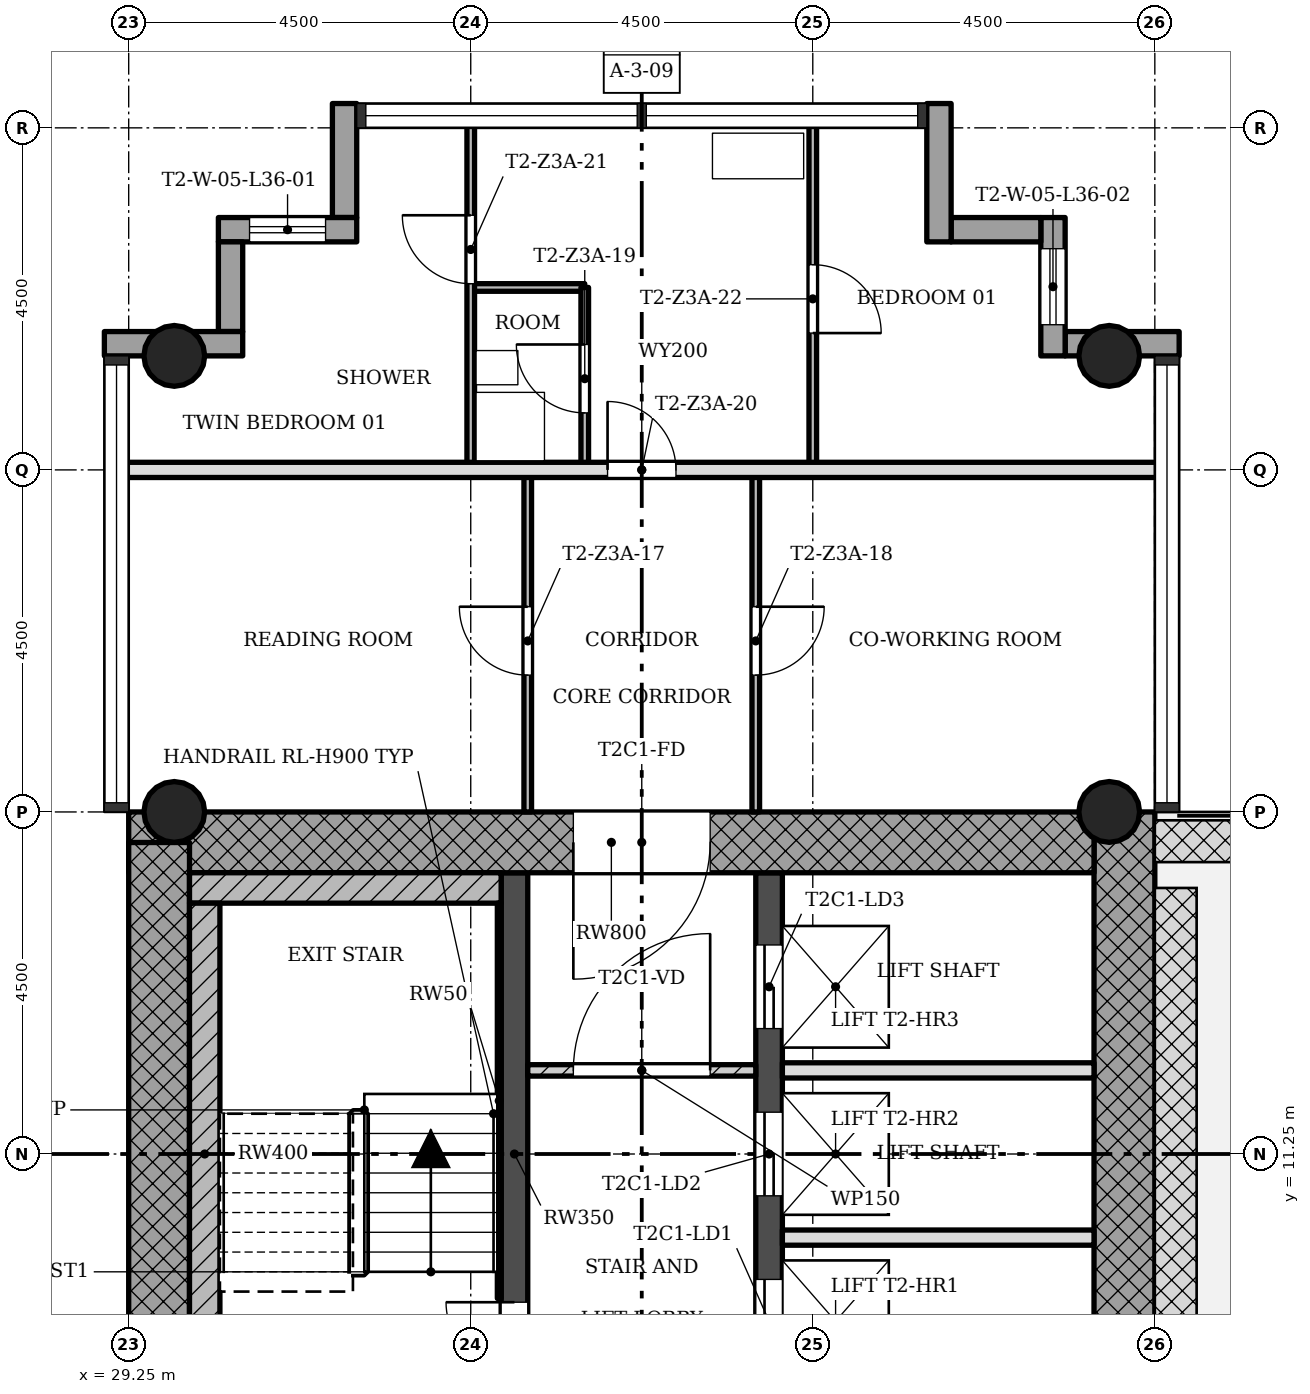
"""IFC4 building model, lengths in metres.
Left out: names, types, materials, properties, quantities, classifications, styles, units other than length and angle.
Written with IfcOpenShell. Run it as: python <this file> out.ifc"""

import sys

from ifc_helpers import new_model, si_unit, direction, frame, frame_2d, origin, origin_2d, place, context, subcontext, project, spatial, rectangle, hollow_circle, extrude, element, fill, save


model = new_model("IFC4")
c1 = context("Model", 3, precision=1e-05, world=origin(), true_north=direction((0.0, 1.0)))
c2 = subcontext(c1, "Body", "Model", "MODEL_VIEW")
j1 = project(units=[si_unit("LENGTHUNIT", "METRE"), si_unit("PLANEANGLEUNIT", "RADIAN")], contexts=[c1])
p1 = place(None, origin())
s1 = spatial("IfcSite", under=j1, at=p1, CompositionType="ELEMENT")
p2 = place(p1, origin())
s2 = spatial("IfcBuilding", under=s1, at=p2, CompositionType="ELEMENT")
p3 = place(p2, frame((0.0, 0.0, 133.7)))
s3 = spatial("IfcBuildingStorey", under=s2, at=p3, CompositionType="ELEMENT", Elevation=133.7)
p4 = place(p3, frame((42.35, 7.55, 0.0), z_axis=(0.0, 0.0, 1.0), x_axis=(0.0, 1.0, 0.0)))
e1 = element("IfcWall", 1, at=p4, inside=s3, PredefinedType="SHEAR", context=c2, shape_type="SweptSolid", body=[
    extrude(rectangle(XDim=8.2, YDim=0.8, at=frame_2d((4.1, 0.0))), origin(), (0.0, 0.0, 1.0), 3.4),
])
p5 = place(p3, frame((41.95, 15.35, 0.0), z_axis=(0.0, 0.0, 1.0), x_axis=(-1.0, 0.0, 0.0)))
e2 = element("IfcWall", 2, at=p5, inside=s3, PredefinedType="SHEAR", context=c2, shape_type="SweptSolid", body=[
    extrude(rectangle(XDim=12.7, YDim=0.8, at=frame_2d((6.35, 0.0))), origin(), (0.0, 0.0, 1.0), 3.4),
])
p6 = place(p5, frame((5.05, 0.0, 0.0)))
e3 = element("IfcOpeningElement", 3, at=p6, cuts=e2, PredefinedType="OPENING", context=c2, shape_type="SweptSolid", body=[
    extrude(rectangle(XDim=1.8, YDim=2.1, at=frame_2d((0.9, 1.05))), frame((0.0, 0.41, 0.0), z_axis=(0.0, -1.0, 0.0), x_axis=(1.0, 0.0, 0.0)), (0.0, 0.0, 1.0), 0.82),
])
p7 = place(p3, frame((29.65, 15.348, 0.0), z_axis=(0.0, 0.0, 1.0), x_axis=(0.0, -1.0, 0.0)))
e4 = element("IfcWall", 4, at=p7, inside=s3, PredefinedType="SHEAR", context=c2, shape_type="SweptSolid", body=[
    extrude(rectangle(XDim=8.796, YDim=0.8, at=frame_2d((4.398, 0.0))), origin(), (0.0, 0.0, 1.0), 3.4),
])
p8 = place(p3, frame((34.325, 7.55, 0.0), z_axis=(0.0, 0.0, 1.0), x_axis=(0.0, 1.0, 0.0)))
e5 = element("IfcWall", 5, at=p8, inside=s3, PredefinedType="SHEAR", context=c2, shape_type="SweptSolid", body=[
    extrude(rectangle(XDim=7.4, YDim=0.35, at=frame_2d((3.7, 0.0))), origin(), (0.0, 0.0, 1.0), 3.4),
])
p9 = place(p8, frame((0.85, 0.0, 0.0)))
e6 = element("IfcOpeningElement", 6, at=p9, cuts=e5, PredefinedType="OPENING", context=c2, shape_type="SweptSolid", body=[
    extrude(rectangle(XDim=0.9, YDim=2.1, at=frame_2d((0.45, 1.05))), frame((0.0, 0.185, 0.0), z_axis=(0.0, -1.0, 0.0), x_axis=(1.0, 0.0, 0.0)), (0.0, 0.0, 1.0), 0.37),
])
p10 = place(p3, frame((37.675, 7.55, 0.0), z_axis=(0.0, 0.0, 1.0), x_axis=(0.0, 1.0, 0.0)))
e7 = element("IfcWall", 7, at=p10, inside=s3, PredefinedType="SHEAR", context=c2, shape_type="SweptSolid", body=[
    extrude(rectangle(XDim=7.4, YDim=0.35, at=frame_2d((3.7, 0.0))), origin(), (0.0, 0.0, 1.0), 3.4),
])
p11 = place(p10, frame((0.95, 0.0, 0.0)))
e8 = element("IfcOpeningElement", 8, at=p11, cuts=e7, PredefinedType="OPENING", context=c2, shape_type="SweptSolid", body=[
    extrude(rectangle(XDim=1.1, YDim=2.1, at=frame_2d((0.55, 1.05))), frame((0.0, 0.185, 0.0), z_axis=(0.0, -1.0, 0.0), x_axis=(1.0, 0.0, 0.0)), (0.0, 0.0, 1.0), 0.37),
])
p12 = place(p10, frame((3.15, 0.0, 0.0)))
e9 = element("IfcOpeningElement", 9, at=p12, cuts=e7, PredefinedType="OPENING", context=c2, shape_type="SweptSolid", body=[
    extrude(rectangle(XDim=1.1, YDim=2.1, at=frame_2d((0.55, 1.05))), frame((0.0, 0.185, 0.0), z_axis=(0.0, -1.0, 0.0), x_axis=(1.0, 0.0, 0.0)), (0.0, 0.0, 1.0), 0.37),
])
p13 = place(p10, frame((5.35, 0.0, 0.0)))
e10 = element("IfcOpeningElement", 10, at=p13, cuts=e7, PredefinedType="OPENING", context=c2, shape_type="SweptSolid", body=[
    extrude(rectangle(XDim=1.1, YDim=2.1, at=frame_2d((0.55, 1.05))), frame((0.0, 0.185, 0.0), z_axis=(0.0, -1.0, 0.0), x_axis=(1.0, 0.0, 0.0)), (0.0, 0.0, 1.0), 0.37),
])
for number, where, z_axis, x_axis in (
    (11, (42.15, 15.75, 0.0), (0.0, 0.0, 1.0), (1.0, 0.0, 0.0)),
    (12, (29.85, 15.75, 0.0), (0.0, 0.0, 1.0), (1.0, 0.0, 0.0)),
    (13, (42.15, 21.75, 0.0), (0.0, 0.0, 1.0), (1.0, 0.0, 0.0)),
    (14, (29.85, 21.75, 0.0), (0.0, 0.0, 1.0), (1.0, 0.0, 0.0)),
):
    element("IfcColumn", number, at=place(p3, frame(where, z_axis=z_axis, x_axis=x_axis)), inside=s3, PredefinedType="COLUMN", context=c2, shape_type="SweptSolid", body=[
        extrude(hollow_circle(Radius=0.4, WallThickness=0.028, at=origin_2d()), origin(), (0.0, 0.0, 1.0), 3.4),
    ])
p14 = place(p3, frame((43.07, 21.91, -0.3), z_axis=(0.0, 0.0, 1.0), x_axis=(-1.0, 0.0, 0.0)))
e15 = element("IfcWall", 15, at=p14, inside=s3, PredefinedType="STANDARD", context=c2, shape_type="SweptSolid", body=[
    extrude(rectangle(XDim=1.5, YDim=0.32, at=frame_2d((0.75, 0.0))), origin(), (0.0, 0.0, 1.0), 3.4),
])
p15 = place(p3, frame((41.41, 21.75, -0.3), z_axis=(0.0, 0.0, 1.0), x_axis=(0.0, 1.0, 0.0)))
e16 = element("IfcWall", 16, at=p15, inside=s3, PredefinedType="STANDARD", context=c2, shape_type="SweptSolid", body=[
    extrude(rectangle(XDim=1.82, YDim=0.32, at=frame_2d((0.91, 0.0))), origin(), (0.0, 0.0, 1.0), 3.4),
])
p16 = place(p15, frame((0.41, 0.0, 1.2)))
e17 = element("IfcOpeningElement", 17, at=p16, cuts=e16, PredefinedType="OPENING", context=c2, shape_type="SweptSolid", body=[
    extrude(rectangle(XDim=1.0, YDim=1.5, at=frame_2d((0.5, 0.75))), frame((0.0, 0.17, 0.0), z_axis=(0.0, -1.0, 0.0), x_axis=(1.0, 0.0, 0.0)), (0.0, 0.0, 1.0), 0.34),
])
p17 = place(p3, frame((41.25, 23.41, -0.3), z_axis=(0.0, 0.0, 1.0), x_axis=(-1.0, 0.0, 0.0)))
e18 = element("IfcWall", 18, at=p17, inside=s3, PredefinedType="STANDARD", context=c2, shape_type="SweptSolid", body=[
    extrude(rectangle(XDim=1.18, YDim=0.32, at=frame_2d((0.59, 0.0))), origin(), (0.0, 0.0, 1.0), 3.4),
])
p18 = place(p3, frame((39.91, 23.25, -0.3), z_axis=(0.0, 0.0, 1.0), x_axis=(0.0, 1.0, 0.0)))
e19 = element("IfcWall", 19, at=p18, inside=s3, PredefinedType="STANDARD", context=c2, shape_type="SweptSolid", body=[
    extrude(rectangle(XDim=1.82, YDim=0.32, at=frame_2d((0.91, 0.0))), origin(), (0.0, 0.0, 1.0), 3.4),
])
p19 = place(p3, frame((32.09, 25.07, -0.3), z_axis=(0.0, 0.0, 1.0), x_axis=(0.0, -1.0, 0.0)))
e20 = element("IfcWall", 20, at=p19, inside=s3, PredefinedType="STANDARD", context=c2, shape_type="SweptSolid", body=[
    extrude(rectangle(XDim=1.5, YDim=0.32, at=frame_2d((0.75, 0.0))), origin(), (0.0, 0.0, 1.0), 3.4),
])
p20 = place(p3, frame((32.25, 23.41, -0.3), z_axis=(0.0, 0.0, 1.0), x_axis=(-1.0, 0.0, 0.0)))
e21 = element("IfcWall", 21, at=p20, inside=s3, PredefinedType="STANDARD", context=c2, shape_type="SweptSolid", body=[
    extrude(rectangle(XDim=1.82, YDim=0.32, at=frame_2d((0.91, 0.0))), origin(), (0.0, 0.0, 1.0), 3.4),
])
p21 = place(p20, frame((0.41, 0.0, 1.2)))
e22 = element("IfcOpeningElement", 22, at=p21, cuts=e21, PredefinedType="OPENING", context=c2, shape_type="SweptSolid", body=[
    extrude(rectangle(XDim=1.0, YDim=1.5, at=frame_2d((0.5, 0.75))), frame((0.0, 0.17, 0.0), z_axis=(0.0, -1.0, 0.0), x_axis=(1.0, 0.0, 0.0)), (0.0, 0.0, 1.0), 0.34),
])
p22 = place(p3, frame((30.59, 23.25, -0.3), z_axis=(0.0, 0.0, 1.0), x_axis=(0.0, -1.0, 0.0)))
e23 = element("IfcWall", 23, at=p22, inside=s3, PredefinedType="STANDARD", context=c2, shape_type="SweptSolid", body=[
    extrude(rectangle(XDim=1.18, YDim=0.32, at=frame_2d((0.59, 0.0))), origin(), (0.0, 0.0, 1.0), 3.4),
])
p23 = place(p3, frame((30.75, 21.91, -0.3), z_axis=(0.0, 0.0, 1.0), x_axis=(-1.0, 0.0, 0.0)))
e24 = element("IfcWall", 24, at=p23, inside=s3, PredefinedType="STANDARD", context=c2, shape_type="SweptSolid", body=[
    extrude(rectangle(XDim=1.82, YDim=0.32, at=frame_2d((0.91, 0.0))), origin(), (0.0, 0.0, 1.0), 3.4),
])
p24 = place(p3, frame((37.5, 12.35, 0.0), z_axis=(0.0, 0.0, 1.0), x_axis=(-1.0, 0.0, 0.0)))
e25 = element("IfcWall", 25, at=p24, inside=s3, PredefinedType="PARTITIONING", context=c2, shape_type="SweptSolid", body=[
    extrude(rectangle(XDim=3.0, YDim=0.15, at=frame_2d((1.5, 0.0))), origin(), (0.0, 0.0, 1.0), 3.0),
])
p25 = place(p24, frame((0.6, 0.0, 0.0)))
e26 = element("IfcOpeningElement", 26, at=p25, cuts=e25, PredefinedType="OPENING", context=c2, shape_type="SweptSolid", body=[
    extrude(rectangle(XDim=1.8, YDim=2.1, at=frame_2d((0.9, 1.05))), frame((0.0, 0.085, 0.0), z_axis=(0.0, -1.0, 0.0), x_axis=(1.0, 0.0, 0.0)), (0.0, 0.0, 1.0), 0.17),
])
for number, where, z_axis, x_axis in (
    (27, (41.95, 10.15, 0.0), (0.0, 0.0, 1.0), (-1.0, 0.0, 0.0)),
    (28, (41.95, 12.35, 0.0), (0.0, 0.0, 1.0), (-1.0, 0.0, 0.0)),
):
    element("IfcWall", number, at=place(p3, frame(where, z_axis=z_axis, x_axis=x_axis)), inside=s3, PredefinedType="SOLIDWALL", context=c2, shape_type="SweptSolid", body=[
        extrude(rectangle(XDim=4.1, YDim=0.2, at=frame_2d((2.05, 0.0))), origin(), (0.0, 0.0, 1.0), 3.0),
    ])
p26 = place(p3, frame((42.85, 20.25, 0.0), z_axis=(0.0, 0.0, 1.0), x_axis=(-1.0, 0.0, 0.0)))
e29 = element("IfcWall", 29, at=p26, inside=s3, PredefinedType="SOLIDWALL", context=c2, shape_type="SweptSolid", body=[
    extrude(rectangle(XDim=13.7, YDim=0.2, at=frame_2d((6.85, 0.0))), origin(), (0.0, 0.0, 1.0), 3.0),
])
p27 = place(p26, frame((6.4, 0.0, 0.0)))
e30 = element("IfcOpeningElement", 30, at=p27, cuts=e29, PredefinedType="OPENING", context=c2, shape_type="SweptSolid", body=[
    extrude(rectangle(XDim=0.9, YDim=2.1, at=frame_2d((0.45, 1.05))), frame((0.0, 0.11, 0.0), z_axis=(0.0, -1.0, 0.0), x_axis=(1.0, 0.0, 0.0)), (0.0, 0.0, 1.0), 0.22),
])
p28 = place(p3, frame((35.25, 22.65, 0.0), z_axis=(0.0, 0.0, 1.0), x_axis=(-1.0, 0.0, 0.0)))
e31 = element("IfcWall", 31, at=p28, inside=s3, PredefinedType="PARTITIONING", context=c2, shape_type="SweptSolid", body=[
    extrude(rectangle(XDim=1.5, YDim=0.1, at=frame_2d((0.75, 0.0))), origin(), (0.0, 0.0, 1.0), 3.0),
])
p29 = place(p3, frame((38.25, 20.25, 0.0), z_axis=(0.0, 0.0, 1.0), x_axis=(0.0, 1.0, 0.0)))
e32 = element("IfcWall", 32, at=p29, inside=s3, PredefinedType="PARTITIONING", context=c2, shape_type="SweptSolid", body=[
    extrude(rectangle(XDim=4.6, YDim=0.1, at=frame_2d((2.3, 0.0))), origin(), (0.0, 0.0, 1.0), 3.0),
])
p30 = place(p29, frame((1.8, 0.0, 0.0)))
e33 = element("IfcOpeningElement", 33, at=p30, cuts=e32, PredefinedType="OPENING", context=c2, shape_type="SweptSolid", body=[
    extrude(rectangle(XDim=0.9, YDim=2.1, at=frame_2d((0.45, 1.05))), frame((0.0, 0.06, 0.0), z_axis=(0.0, -1.0, 0.0), x_axis=(1.0, 0.0, 0.0)), (0.0, 0.0, 1.0), 0.12),
])
p31 = place(p3, frame((37.5, 15.75, 0.0), z_axis=(0.0, 0.0, 1.0), x_axis=(0.0, 1.0, 0.0)))
e34 = element("IfcWall", 34, at=p31, inside=s3, PredefinedType="PARTITIONING", context=c2, shape_type="SweptSolid", body=[
    extrude(rectangle(XDim=4.5, YDim=0.1, at=frame_2d((2.25, 0.0))), origin(), (0.0, 0.0, 1.0), 3.0),
])
p32 = place(p31, frame((1.8, 0.0, 0.0)))
e35 = element("IfcOpeningElement", 35, at=p32, cuts=e34, PredefinedType="OPENING", context=c2, shape_type="SweptSolid", body=[
    extrude(rectangle(XDim=0.9, YDim=2.1, at=frame_2d((0.45, 1.05))), frame((0.0, 0.06, 0.0), z_axis=(0.0, -1.0, 0.0), x_axis=(1.0, 0.0, 0.0)), (0.0, 0.0, 1.0), 0.12),
])
p33 = place(p3, frame((35.25, 20.25, 0.0), z_axis=(0.0, 0.0, 1.0), x_axis=(0.0, 1.0, 0.0)))
e36 = element("IfcWall", 36, at=p33, inside=s3, PredefinedType="PARTITIONING", context=c2, shape_type="SweptSolid", body=[
    extrude(rectangle(XDim=2.4, YDim=0.1, at=frame_2d((1.2, 0.0))), origin(), (0.0, 0.0, 1.0), 3.0),
])
p34 = place(p33, frame((0.75, 0.0, 0.0)))
e37 = element("IfcOpeningElement", 37, at=p34, cuts=e36, PredefinedType="OPENING", context=c2, shape_type="SweptSolid", body=[
    extrude(rectangle(XDim=0.9, YDim=2.1, at=frame_2d((0.45, 1.05))), frame((0.0, 0.06, 0.0), z_axis=(0.0, -1.0, 0.0), x_axis=(1.0, 0.0, 0.0)), (0.0, 0.0, 1.0), 0.12),
])
p35 = place(p3, frame((34.5, 15.75, 0.0), z_axis=(0.0, 0.0, 1.0), x_axis=(0.0, 1.0, 0.0)))
e38 = element("IfcWall", 38, at=p35, inside=s3, PredefinedType="PARTITIONING", context=c2, shape_type="SweptSolid", body=[
    extrude(rectangle(XDim=4.5, YDim=0.1, at=frame_2d((2.25, 0.0))), origin(), (0.0, 0.0, 1.0), 3.0),
])
p36 = place(p35, frame((1.8, 0.0, 0.0)))
e39 = element("IfcOpeningElement", 39, at=p36, cuts=e38, PredefinedType="OPENING", context=c2, shape_type="SweptSolid", body=[
    extrude(rectangle(XDim=0.9, YDim=2.1, at=frame_2d((0.45, 1.05))), frame((0.0, 0.06, 0.0), z_axis=(0.0, -1.0, 0.0), x_axis=(1.0, 0.0, 0.0)), (0.0, 0.0, 1.0), 0.12),
])
p37 = place(p3, frame((33.75, 20.25, 0.0), z_axis=(0.0, 0.0, 1.0), x_axis=(0.0, 1.0, 0.0)))
e40 = element("IfcWall", 40, at=p37, inside=s3, PredefinedType="PARTITIONING", context=c2, shape_type="SweptSolid", body=[
    extrude(rectangle(XDim=4.6, YDim=0.1, at=frame_2d((2.3, 0.0))), origin(), (0.0, 0.0, 1.0), 3.0),
])
p38 = place(p37, frame((2.45, 0.0, 0.0)))
e41 = element("IfcOpeningElement", 41, at=p38, cuts=e40, PredefinedType="OPENING", context=c2, shape_type="SweptSolid", body=[
    extrude(rectangle(XDim=0.9, YDim=2.1, at=frame_2d((0.45, 1.05))), frame((0.0, 0.06, 0.0), z_axis=(0.0, -1.0, 0.0), x_axis=(1.0, 0.0, 0.0)), (0.0, 0.0, 1.0), 0.12),
])
p39 = place(p3, frame((34.15, 14.75, 0.0), z_axis=(0.0, 0.0, 1.0), x_axis=(-1.0, 0.0, 0.0)))
e42 = element("IfcWall", 42, at=p39, inside=s3, PredefinedType="SHEAR", context=c2, shape_type="SweptSolid", body=[
    extrude(rectangle(XDim=4.1, YDim=0.4, at=frame_2d((2.05, 0.0))), origin(), (0.0, 0.0, 1.0), 3.4),
])
p40 = place(p3, frame((30.25, 7.95, 0.0), z_axis=(0.0, 0.0, 1.0), x_axis=(0.0, 1.0, 0.0)))
e43 = element("IfcWall", 43, at=p40, inside=s3, PredefinedType="SHEAR", context=c2, shape_type="SweptSolid", body=[
    extrude(rectangle(XDim=6.6, YDim=0.4, at=frame_2d((3.3, 0.0))), origin(), (0.0, 0.0, 1.0), 3.4),
])
p41 = place(p3, frame((34.125, 9.35, 0.0), z_axis=(0.0, 0.0, 1.0), x_axis=(0.0, 1.0, 0.0)))
e44 = element("IfcWall", 44, at=p41, inside=s3, PredefinedType="SHEAR", context=c2, shape_type="SweptSolid", body=[
    extrude(rectangle(XDim=5.2, YDim=0.05, at=frame_2d((2.6, 0.0))), origin(), (0.0, 0.0, 1.0), 3.4),
])
p42 = place(p25, origin())
e45 = element("IfcDoor", 45, at=p42, inside=s3, OperationType="SINGLE_SWING_LEFT", PredefinedType="DOOR", context=c2, shape_type="SweptSolid", body=[
    extrude(rectangle(XDim=1.8, YDim=2.1, at=frame_2d((0.9, 1.05))), frame((0.0, 0.025, 0.0), z_axis=(0.0, -1.0, 0.0), x_axis=(1.0, 0.0, 0.0)), (0.0, 0.0, 1.0), 0.05),
])
fill(e26, e45)
p43 = place(p36, origin())
e46 = element("IfcDoor", 46, at=p43, inside=s3, OperationType="SINGLE_SWING_LEFT", PredefinedType="DOOR", context=c2, shape_type="SweptSolid", body=[
    extrude(rectangle(XDim=0.9, YDim=2.1, at=frame_2d((0.45, 1.05))), frame((0.0, 0.025, 0.0), z_axis=(0.0, -1.0, 0.0), x_axis=(1.0, 0.0, 0.0)), (0.0, 0.0, 1.0), 0.05),
])
fill(e39, e46)
p44 = place(p32, origin())
e47 = element("IfcDoor", 47, at=p44, inside=s3, OperationType="SINGLE_SWING_RIGHT", PredefinedType="DOOR", context=c2, shape_type="SweptSolid", body=[
    extrude(rectangle(XDim=0.9, YDim=2.1, at=frame_2d((0.45, 1.05))), frame((0.0, 0.025, 0.0), z_axis=(0.0, -1.0, 0.0), x_axis=(1.0, 0.0, 0.0)), (0.0, 0.0, 1.0), 0.05),
])
fill(e35, e47)
p45 = place(p34, origin())
e48 = element("IfcDoor", 48, at=p45, inside=s3, OperationType="SINGLE_SWING_LEFT", PredefinedType="DOOR", context=c2, shape_type="SweptSolid", body=[
    extrude(rectangle(XDim=0.9, YDim=2.1, at=frame_2d((0.45, 1.05))), frame((0.0, 0.025, 0.0), z_axis=(0.0, -1.0, 0.0), x_axis=(1.0, 0.0, 0.0)), (0.0, 0.0, 1.0), 0.05),
])
fill(e37, e48)
p46 = place(p27, origin())
e49 = element("IfcDoor", 49, at=p46, inside=s3, OperationType="SINGLE_SWING_RIGHT", PredefinedType="DOOR", context=c2, shape_type="SweptSolid", body=[
    extrude(rectangle(XDim=0.9, YDim=2.1, at=frame_2d((0.45, 1.05))), frame((0.0, 0.025, 0.0), z_axis=(0.0, -1.0, 0.0), x_axis=(1.0, 0.0, 0.0)), (0.0, 0.0, 1.0), 0.05),
])
fill(e30, e49)
p47 = place(p38, origin())
e50 = element("IfcDoor", 50, at=p47, inside=s3, OperationType="SINGLE_SWING_LEFT", PredefinedType="DOOR", context=c2, shape_type="SweptSolid", body=[
    extrude(rectangle(XDim=0.9, YDim=2.1, at=frame_2d((0.45, 1.05))), frame((0.0, 0.025, 0.0), z_axis=(0.0, -1.0, 0.0), x_axis=(1.0, 0.0, 0.0)), (0.0, 0.0, 1.0), 0.05),
])
fill(e41, e50)
p48 = place(p30, origin())
e51 = element("IfcDoor", 51, at=p48, inside=s3, OperationType="SINGLE_SWING_LEFT", PredefinedType="DOOR", context=c2, shape_type="SweptSolid", body=[
    extrude(rectangle(XDim=0.9, YDim=2.1, at=frame_2d((0.45, 1.05))), frame((0.0, 0.025, 0.0), z_axis=(0.0, -1.0, 0.0), x_axis=(1.0, 0.0, 0.0)), (0.0, 0.0, 1.0), 0.05),
])
fill(e33, e51)
p49 = place(p9, origin())
e52 = element("IfcDoor", 52, at=p49, inside=s3, OperationType="SINGLE_SWING_LEFT", PredefinedType="DOOR", context=c2, shape_type="SweptSolid", body=[
    extrude(rectangle(XDim=0.9, YDim=2.1, at=frame_2d((0.45, 1.05))), frame((0.0, 0.025, 0.0), z_axis=(0.0, -1.0, 0.0), x_axis=(1.0, 0.0, 0.0)), (0.0, 0.0, 1.0), 0.05),
])
fill(e6, e52)
p50 = place(p11, origin())
e53 = element("IfcDoor", 53, at=p50, inside=s3, OperationType="SLIDING_TO_LEFT", PredefinedType="DOOR", context=c2, shape_type="SweptSolid", body=[
    extrude(rectangle(XDim=1.1, YDim=2.1, at=frame_2d((0.55, 1.05))), frame((0.0, 0.025, 0.0), z_axis=(0.0, -1.0, 0.0), x_axis=(1.0, 0.0, 0.0)), (0.0, 0.0, 1.0), 0.05),
])
fill(e8, e53)
p51 = place(p12, origin())
e54 = element("IfcDoor", 54, at=p51, inside=s3, OperationType="SLIDING_TO_LEFT", PredefinedType="DOOR", context=c2, shape_type="SweptSolid", body=[
    extrude(rectangle(XDim=1.1, YDim=2.1, at=frame_2d((0.55, 1.05))), frame((0.0, 0.025, 0.0), z_axis=(0.0, -1.0, 0.0), x_axis=(1.0, 0.0, 0.0)), (0.0, 0.0, 1.0), 0.05),
])
fill(e9, e54)
p52 = place(p13, origin())
e55 = element("IfcDoor", 55, at=p52, inside=s3, OperationType="SLIDING_TO_LEFT", PredefinedType="DOOR", context=c2, shape_type="SweptSolid", body=[
    extrude(rectangle(XDim=1.1, YDim=2.1, at=frame_2d((0.55, 1.05))), frame((0.0, 0.025, 0.0), z_axis=(0.0, -1.0, 0.0), x_axis=(1.0, 0.0, 0.0)), (0.0, 0.0, 1.0), 0.05),
])
fill(e10, e55)
p53 = place(p6, origin())
e56 = element("IfcDoor", 56, at=p53, inside=s3, OperationType="SINGLE_SWING_LEFT", PredefinedType="DOOR", context=c2, shape_type="SweptSolid", body=[
    extrude(rectangle(XDim=1.8, YDim=2.1, at=frame_2d((0.9, 1.05))), frame((0.0, 0.025, 0.0), z_axis=(0.0, -1.0, 0.0), x_axis=(1.0, 0.0, 0.0)), (0.0, 0.0, 1.0), 0.05),
])
fill(e3, e56)
p54 = place(p21, origin())
e57 = element("IfcWindow", 57, at=p54, inside=s3, PartitioningType="SINGLE_PANEL", PredefinedType="WINDOW", context=c2, shape_type="SweptSolid", body=[
    extrude(rectangle(XDim=1.0, YDim=1.5, at=frame_2d((0.5, 0.75))), frame((0.0, 0.03, 0.0), z_axis=(0.0, -1.0, 0.0), x_axis=(1.0, 0.0, 0.0)), (0.0, 0.0, 1.0), 0.06),
])
fill(e22, e57)
p55 = place(p16, origin())
e58 = element("IfcWindow", 58, at=p55, inside=s3, PartitioningType="SINGLE_PANEL", PredefinedType="WINDOW", context=c2, shape_type="SweptSolid", body=[
    extrude(rectangle(XDim=1.0, YDim=1.5, at=frame_2d((0.5, 0.75))), frame((0.0, 0.03, 0.0), z_axis=(0.0, -1.0, 0.0), x_axis=(1.0, 0.0, 0.0)), (0.0, 0.0, 1.0), 0.06),
])
fill(e17, e58)
save(model, sys.argv[1])
